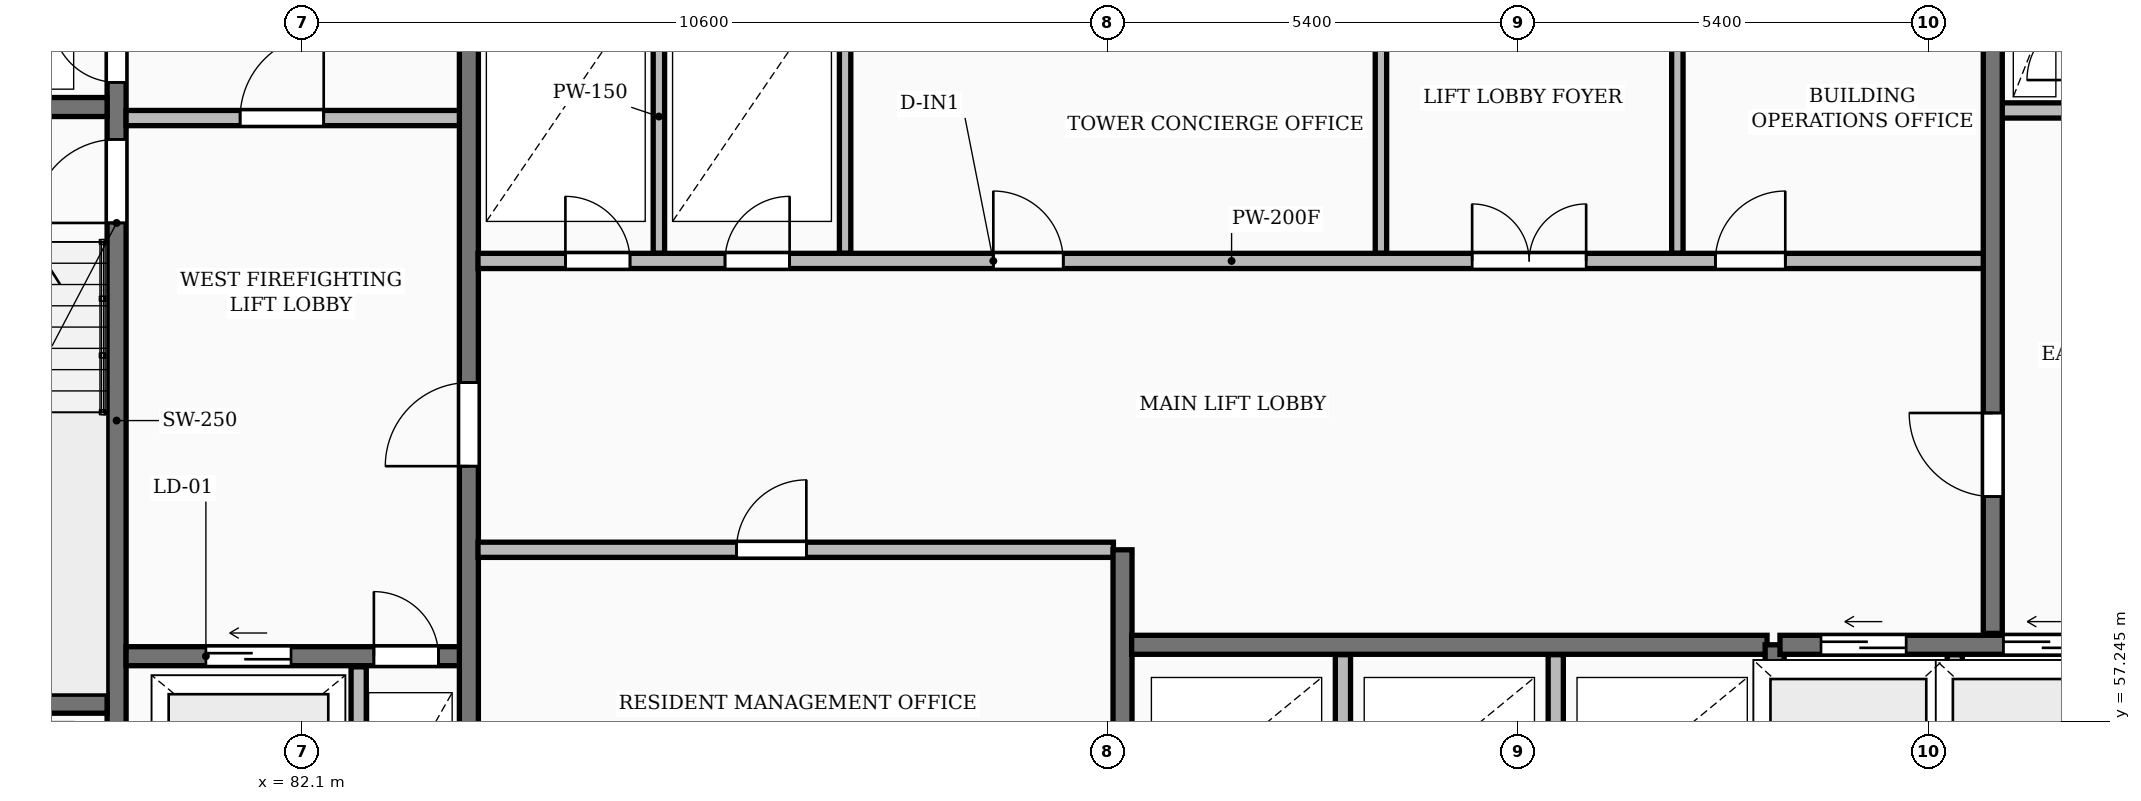
"""IFC4 building model, lengths in metres.
Left out: names, types, materials, properties, quantities, classifications, styles, units other than length and angle.
Written with IfcOpenShell. Run it as: python <this file> out.ifc"""

import sys

from ifc_helpers import new_model, si_unit, direction, frame, frame_2d, origin, place, context, subcontext, project, spatial, rectangle, extrude, element, fill, save


model = new_model("IFC4")
c1 = context("Model", 3, precision=1e-05, world=origin(), true_north=direction((0.0, 1.0)))
c2 = subcontext(c1, "Body", "Model", "MODEL_VIEW")
j1 = project(units=[si_unit("LENGTHUNIT", "METRE"), si_unit("PLANEANGLEUNIT", "RADIAN")], contexts=[c1])
p1 = place(None, origin())
s1 = spatial("IfcSite", under=j1, at=p1, CompositionType="ELEMENT")
p2 = place(p1, origin())
s2 = spatial("IfcBuilding", under=s1, at=p2, CompositionType="ELEMENT")
p3 = place(p2, frame((0.0, 0.0, 178.35)))
s3 = spatial("IfcBuildingStorey", under=s2, at=p3, CompositionType="ELEMENT", Elevation=178.35)
p4 = place(p3, frame((79.665, 55.4, 0.0), z_axis=(0.0, 0.0, 1.0), x_axis=(0.0, 1.0, 0.0)))
e1 = element("IfcWall", 1, at=p4, inside=s3, PredefinedType="SHEAR", context=c2, shape_type="SweptSolid", body=[
    extrude(rectangle(XDim=11.6, YDim=0.25, at=frame_2d((5.8, 0.0))), origin(), (0.0, 0.0, 1.0), 3.25),
])
p5 = place(p4, frame((0.55, 0.0, 0.0)))
e2 = element("IfcOpeningElement", 2, at=p5, cuts=e1, PredefinedType="OPENING", context=c2, shape_type="SweptSolid", body=[
    extrude(rectangle(XDim=0.85, YDim=2.05, at=frame_2d((0.425, 1.025))), frame((0.0, 0.135, 0.0), z_axis=(0.0, -1.0, 0.0), x_axis=(1.0, 0.0, 0.0)), (0.0, 0.0, 1.0), 0.27),
])
p6 = place(p4, frame((8.4, 0.0, 0.0)))
e3 = element("IfcOpeningElement", 3, at=p6, cuts=e1, PredefinedType="OPENING", context=c2, shape_type="SweptSolid", body=[
    extrude(rectangle(XDim=1.1, YDim=2.1, at=frame_2d((0.55, 1.05))), frame((0.0, 0.135, 0.0), z_axis=(0.0, -1.0, 0.0), x_axis=(1.0, 0.0, 0.0)), (0.0, 0.0, 1.0), 0.27),
])
p7 = place(p4, frame((10.25, 0.0, 0.0)))
e4 = element("IfcOpeningElement", 4, at=p7, cuts=e1, PredefinedType="OPENING", context=c2, shape_type="SweptSolid", body=[
    extrude(rectangle(XDim=0.85, YDim=2.05, at=frame_2d((0.425, 1.025))), frame((0.0, 0.135, 0.0), z_axis=(0.0, -1.0, 0.0), x_axis=(1.0, 0.0, 0.0)), (0.0, 0.0, 1.0), 0.27),
])
for number, where, z_axis, x_axis in (
    (5, (76.3, 57.475, 0.0), (0.0, 0.0, 1.0), (1.0, 0.0, 0.0)),
    (6, (76.3, 65.325, 0.0), (0.0, 0.0, 1.0), (1.0, 0.0, 0.0)),
):
    element("IfcWall", number, at=place(p3, frame(where, z_axis=z_axis, x_axis=x_axis)), inside=s3, PredefinedType="SHEAR", context=c2, shape_type="SweptSolid", body=[
        extrude(rectangle(XDim=3.24, YDim=0.25, at=frame_2d((1.62, 0.0))), origin(), (0.0, 0.0, 1.0), 3.25),
    ])
p8 = place(p3, frame((79.79, 58.1, 0.0), z_axis=(0.0, 0.0, 1.0), x_axis=(1.0, 0.0, 0.0)))
e7 = element("IfcWall", 7, at=p8, inside=s3, PredefinedType="SHEAR", context=c2, shape_type="SweptSolid", body=[
    extrude(rectangle(XDim=4.39, YDim=0.25, at=frame_2d((2.195, 0.0))), origin(), (0.0, 0.0, 1.0), 3.25),
])
p9 = place(p8, frame((1.05, 0.0, 0.0)))
e8 = element("IfcOpeningElement", 8, at=p9, cuts=e7, PredefinedType="OPENING", context=c2, shape_type="SweptSolid", body=[
    extrude(rectangle(XDim=1.12, YDim=2.12, at=frame_2d((0.56, 1.06))), frame((0.0, 0.135, 0.0), z_axis=(0.0, -1.0, 0.0), x_axis=(1.0, 0.0, 0.0)), (0.0, 0.0, 1.0), 0.27),
])
p10 = place(p8, frame((3.26, 0.0, 0.0)))
e9 = element("IfcOpeningElement", 9, at=p10, cuts=e7, PredefinedType="OPENING", context=c2, shape_type="SweptSolid", body=[
    extrude(rectangle(XDim=0.85, YDim=2.05, at=frame_2d((0.425, 1.025))), frame((0.0, 0.135, 0.0), z_axis=(0.0, -1.0, 0.0), x_axis=(1.0, 0.0, 0.0)), (0.0, 0.0, 1.0), 0.27),
])
p11 = place(p3, frame((82.85, 55.4, 0.0), z_axis=(0.0, 0.0, 1.0), x_axis=(0.0, 1.0, 0.0)))
e10 = element("IfcWall", 10, at=p11, inside=s3, PredefinedType="PARTITIONING", context=c2, shape_type="SweptSolid", body=[
    extrude(rectangle(XDim=2.56, YDim=0.2, at=frame_2d((1.28, 0.0))), origin(), (0.0, 0.0, 1.0), 2.97),
])
p12 = place(p3, frame((79.79, 65.18, 0.0), z_axis=(0.0, 0.0, 1.0), x_axis=(1.0, 0.0, 0.0)))
e11 = element("IfcWall", 11, at=p12, inside=s3, PredefinedType="PARTITIONING", context=c2, shape_type="SweptSolid", body=[
    extrude(rectangle(XDim=4.39, YDim=0.2, at=frame_2d((2.195, 0.0))), origin(), (0.0, 0.0, 1.0), 2.97),
])
p13 = place(p12, frame((1.5, 0.0, 0.0)))
e12 = element("IfcOpeningElement", 12, at=p13, cuts=e11, PredefinedType="OPENING", context=c2, shape_type="SweptSolid", body=[
    extrude(rectangle(XDim=1.1, YDim=2.1, at=frame_2d((0.55, 1.05))), frame((0.0, 0.11, 0.0), z_axis=(0.0, -1.0, 0.0), x_axis=(1.0, 0.0, 0.0)), (0.0, 0.0, 1.0), 0.22),
])
p14 = place(p3, frame((84.3, 55.4, 0.0), z_axis=(0.0, 0.0, 1.0), x_axis=(0.0, 1.0, 0.0)))
e13 = element("IfcWall", 13, at=p14, inside=s3, PredefinedType="SHEAR", context=c2, shape_type="SweptSolid", body=[
    extrude(rectangle(XDim=11.6, YDim=0.25, at=frame_2d((5.8, 0.0))), origin(), (0.0, 0.0, 1.0), 3.25),
])
p15 = place(p14, frame((5.2, 0.0, 0.0)))
e14 = element("IfcOpeningElement", 14, at=p15, cuts=e13, PredefinedType="OPENING", context=c2, shape_type="SweptSolid", body=[
    extrude(rectangle(XDim=1.1, YDim=2.1, at=frame_2d((0.55, 1.05))), frame((0.0, 0.135, 0.0), z_axis=(0.0, -1.0, 0.0), x_axis=(1.0, 0.0, 0.0)), (0.0, 0.0, 1.0), 0.27),
])
p16 = place(p3, frame((84.42, 59.5, 0.0), z_axis=(0.0, 0.0, 1.0), x_axis=(1.0, 0.0, 0.0)))
e15 = element("IfcWall", 15, at=p16, inside=s3, PredefinedType="PARTITIONING", context=c2, shape_type="SweptSolid", body=[
    extrude(rectangle(XDim=8.36, YDim=0.2, at=frame_2d((4.18, 0.0))), origin(), (0.0, 0.0, 1.0), 2.97),
])
p17 = place(p16, frame((3.4, 0.0, 0.0)))
e16 = element("IfcOpeningElement", 16, at=p17, cuts=e15, PredefinedType="OPENING", context=c2, shape_type="SweptSolid", body=[
    extrude(rectangle(XDim=0.92, YDim=2.08, at=frame_2d((0.46, 1.04))), frame((0.0, 0.11, 0.0), z_axis=(0.0, -1.0, 0.0), x_axis=(1.0, 0.0, 0.0)), (0.0, 0.0, 1.0), 0.22),
])
p18 = place(p3, frame((92.9, 55.4, 0.0), z_axis=(0.0, 0.0, 1.0), x_axis=(0.0, 1.0, 0.0)))
e17 = element("IfcWall", 17, at=p18, inside=s3, PredefinedType="SHEAR", context=c2, shape_type="SweptSolid", body=[
    extrude(rectangle(XDim=4.1, YDim=0.25, at=frame_2d((2.05, 0.0))), origin(), (0.0, 0.0, 1.0), 3.25),
])
for number, where, z_axis, x_axis in (
    (18, (95.8, 55.4, 0.0), (0.0, 0.0, 1.0), (0.0, 1.0, 0.0)),
    (19, (98.6, 55.4, 0.0), (0.0, 0.0, 1.0), (0.0, 1.0, 0.0)),
):
    element("IfcWall", number, at=place(p3, frame(where, z_axis=z_axis, x_axis=x_axis)), inside=s3, PredefinedType="PARTITIONING", context=c2, shape_type="SweptSolid", body=[
        extrude(rectangle(XDim=2.72, YDim=0.2, at=frame_2d((1.36, 0.0))), origin(), (0.0, 0.0, 1.0), 2.97),
    ])
p19 = place(p3, frame((93.02, 58.25, 0.0), z_axis=(0.0, 0.0, 1.0), x_axis=(1.0, 0.0, 0.0)))
e20 = element("IfcWall", 20, at=p19, inside=s3, PredefinedType="SHEAR", context=c2, shape_type="SweptSolid", body=[
    extrude(rectangle(XDim=8.36, YDim=0.25, at=frame_2d((4.18, 0.0))), origin(), (0.0, 0.0, 1.0), 3.25),
])
p20 = place(p3, frame((101.48, 55.4, 0.0), z_axis=(0.0, 0.0, 1.0), x_axis=(0.0, 1.0, 0.0)))
e21 = element("IfcWall", 21, at=p20, inside=s3, PredefinedType="SHEAR", context=c2, shape_type="SweptSolid", body=[
    extrude(rectangle(XDim=2.85, YDim=0.25, at=frame_2d((1.425, 0.0))), origin(), (0.0, 0.0, 1.0), 3.25),
])
p21 = place(p3, frame((103.85, 55.4, 0.0), z_axis=(0.0, 0.0, 1.0), x_axis=(0.0, 1.0, 0.0)))
e22 = element("IfcWall", 22, at=p21, inside=s3, PredefinedType="PARTITIONING", context=c2, shape_type="SweptSolid", body=[
    extrude(rectangle(XDim=2.72, YDim=0.2, at=frame_2d((1.36, 0.0))), origin(), (0.0, 0.0, 1.0), 2.97),
])
p22 = place(p3, frame((101.55, 58.25, 0.0), z_axis=(0.0, 0.0, 1.0), x_axis=(1.0, 0.0, 0.0)))
e23 = element("IfcWall", 23, at=p22, inside=s3, PredefinedType="SHEAR", context=c2, shape_type="SweptSolid", body=[
    extrude(rectangle(XDim=4.6, YDim=0.25, at=frame_2d((2.3, 0.0))), origin(), (0.0, 0.0, 1.0), 3.25),
])
p23 = place(p22, frame((0.54, 0.0, 0.0)))
e24 = element("IfcOpeningElement", 24, at=p23, cuts=e23, PredefinedType="OPENING", context=c2, shape_type="SweptSolid", body=[
    extrude(rectangle(XDim=1.12, YDim=2.12, at=frame_2d((0.56, 1.06))), frame((0.0, 0.135, 0.0), z_axis=(0.0, -1.0, 0.0), x_axis=(1.0, 0.0, 0.0)), (0.0, 0.0, 1.0), 0.27),
])
p24 = place(p22, frame((2.94, 0.0, 0.0)))
e25 = element("IfcOpeningElement", 25, at=p24, cuts=e23, PredefinedType="OPENING", context=c2, shape_type="SweptSolid", body=[
    extrude(rectangle(XDim=1.12, YDim=2.12, at=frame_2d((0.56, 1.06))), frame((0.0, 0.135, 0.0), z_axis=(0.0, -1.0, 0.0), x_axis=(1.0, 0.0, 0.0)), (0.0, 0.0, 1.0), 0.27),
])
for number, where, z_axis, x_axis in (
    (26, (86.8, 63.4, 0.0), (0.0, 0.0, 1.0), (0.0, 1.0, 0.0)),
    (27, (89.25, 63.4, 0.0), (0.0, 0.0, 1.0), (0.0, 1.0, 0.0)),
    (28, (96.3, 63.4, 0.0), (0.0, 0.0, 1.0), (0.0, 1.0, 0.0)),
    (29, (100.2, 63.4, 0.0), (0.0, 0.0, 1.0), (0.0, 1.0, 0.0)),
):
    element("IfcWall", number, at=place(p3, frame(where, z_axis=z_axis, x_axis=x_axis)), inside=s3, PredefinedType="PARTITIONING", context=c2, shape_type="SweptSolid", body=[
        extrude(rectangle(XDim=3.6, YDim=0.15, at=frame_2d((1.8, 0.0))), origin(), (0.0, 0.0, 1.0), 2.97),
    ])
p25 = place(p3, frame((84.42, 63.3, 0.0), z_axis=(0.0, 0.0, 1.0), x_axis=(1.0, 0.0, 0.0)))
e30 = element("IfcWall", 30, at=p25, inside=s3, PredefinedType="PARTITIONING", context=c2, shape_type="SweptSolid", body=[
    extrude(rectangle(XDim=19.83, YDim=0.2, at=frame_2d((9.915, 0.0))), origin(), (0.0, 0.0, 1.0), 2.97),
])
p26 = place(p25, frame((1.15, 0.0, 0.0)))
e31 = element("IfcOpeningElement", 31, at=p26, cuts=e30, PredefinedType="OPENING", context=c2, shape_type="SweptSolid", body=[
    extrude(rectangle(XDim=0.85, YDim=2.05, at=frame_2d((0.425, 1.025))), frame((0.0, 0.11, 0.0), z_axis=(0.0, -1.0, 0.0), x_axis=(1.0, 0.0, 0.0)), (0.0, 0.0, 1.0), 0.22),
])
p27 = place(p25, frame((3.25, 0.0, 0.0)))
e32 = element("IfcOpeningElement", 32, at=p27, cuts=e30, PredefinedType="OPENING", context=c2, shape_type="SweptSolid", body=[
    extrude(rectangle(XDim=0.85, YDim=2.05, at=frame_2d((0.425, 1.025))), frame((0.0, 0.11, 0.0), z_axis=(0.0, -1.0, 0.0), x_axis=(1.0, 0.0, 0.0)), (0.0, 0.0, 1.0), 0.22),
])
p28 = place(p25, frame((13.08, 0.0, 0.0)))
e33 = element("IfcOpeningElement", 33, at=p28, cuts=e30, PredefinedType="OPENING", context=c2, shape_type="SweptSolid", body=[
    extrude(rectangle(XDim=1.5, YDim=2.2, at=frame_2d((0.75, 1.1))), frame((0.0, 0.11, 0.0), z_axis=(0.0, -1.0, 0.0), x_axis=(1.0, 0.0, 0.0)), (0.0, 0.0, 1.0), 0.22),
])
p29 = place(p25, frame((6.78, 0.0, 0.0)))
e34 = element("IfcOpeningElement", 34, at=p29, cuts=e30, PredefinedType="OPENING", context=c2, shape_type="SweptSolid", body=[
    extrude(rectangle(XDim=0.92, YDim=2.08, at=frame_2d((0.46, 1.04))), frame((0.0, 0.11, 0.0), z_axis=(0.0, -1.0, 0.0), x_axis=(1.0, 0.0, 0.0)), (0.0, 0.0, 1.0), 0.22),
])
p30 = place(p25, frame((16.28, 0.0, 0.0)))
e35 = element("IfcOpeningElement", 35, at=p30, cuts=e30, PredefinedType="OPENING", context=c2, shape_type="SweptSolid", body=[
    extrude(rectangle(XDim=0.92, YDim=2.08, at=frame_2d((0.46, 1.04))), frame((0.0, 0.11, 0.0), z_axis=(0.0, -1.0, 0.0), x_axis=(1.0, 0.0, 0.0)), (0.0, 0.0, 1.0), 0.22),
])
p31 = place(p3, frame((104.45, 65.28, 0.0), z_axis=(0.0, 0.0, 1.0), x_axis=(1.0, 0.0, 0.0)))
e36 = element("IfcWall", 36, at=p31, inside=s3, PredefinedType="PARTITIONING", context=c2, shape_type="SweptSolid", body=[
    extrude(rectangle(XDim=1.2, YDim=0.2, at=frame_2d((0.6, 0.0))), origin(), (0.0, 0.0, 1.0), 2.97),
])
p32 = place(p3, frame((104.35, 58.4, 0.0), z_axis=(0.0, 0.0, 1.0), x_axis=(0.0, 1.0, 0.0)))
e37 = element("IfcWall", 37, at=p32, inside=s3, PredefinedType="SHEAR", context=c2, shape_type="SweptSolid", body=[
    extrude(rectangle(XDim=8.6, YDim=0.25, at=frame_2d((4.3, 0.0))), origin(), (0.0, 0.0, 1.0), 3.25),
])
p33 = place(p32, frame((1.8, 0.0, 0.0)))
e38 = element("IfcOpeningElement", 38, at=p33, cuts=e37, PredefinedType="OPENING", context=c2, shape_type="SweptSolid", body=[
    extrude(rectangle(XDim=1.1, YDim=2.1, at=frame_2d((0.55, 1.05))), frame((0.0, 0.135, 0.0), z_axis=(0.0, -1.0, 0.0), x_axis=(1.0, 0.0, 0.0)), (0.0, 0.0, 1.0), 0.27),
])
p34 = place(p6, origin())
e39 = element("IfcDoor", 39, at=p34, inside=s3, OperationType="SINGLE_SWING_LEFT", PredefinedType="DOOR", context=c2, shape_type="SweptSolid", body=[
    extrude(rectangle(XDim=1.1, YDim=2.1, at=frame_2d((0.55, 1.05))), frame((0.0, 0.025, 0.0), z_axis=(0.0, -1.0, 0.0), x_axis=(1.0, 0.0, 0.0)), (0.0, 0.0, 1.0), 0.05),
])
fill(e3, e39)
p35 = place(p7, origin())
e40 = element("IfcDoor", 40, at=p35, inside=s3, OperationType="SINGLE_SWING_RIGHT", PredefinedType="DOOR", context=c2, shape_type="SweptSolid", body=[
    extrude(rectangle(XDim=0.85, YDim=2.05, at=frame_2d((0.425, 1.025))), frame((0.0, 0.025, 0.0), z_axis=(0.0, -1.0, 0.0), x_axis=(1.0, 0.0, 0.0)), (0.0, 0.0, 1.0), 0.05),
])
fill(e4, e40)
p36 = place(p9, origin())
e41 = element("IfcDoor", 41, at=p36, inside=s3, OperationType="SLIDING_TO_LEFT", PredefinedType="DOOR", context=c2, shape_type="SweptSolid", body=[
    extrude(rectangle(XDim=1.12, YDim=2.12, at=frame_2d((0.56, 1.06))), frame((0.0, 0.025, 0.0), z_axis=(0.0, -1.0, 0.0), x_axis=(1.0, 0.0, 0.0)), (0.0, 0.0, 1.0), 0.05),
])
fill(e8, e41)
p37 = place(p10, origin())
e42 = element("IfcDoor", 42, at=p37, inside=s3, OperationType="SINGLE_SWING_LEFT", PredefinedType="DOOR", context=c2, shape_type="SweptSolid", body=[
    extrude(rectangle(XDim=0.85, YDim=2.05, at=frame_2d((0.425, 1.025))), frame((0.0, 0.025, 0.0), z_axis=(0.0, -1.0, 0.0), x_axis=(1.0, 0.0, 0.0)), (0.0, 0.0, 1.0), 0.05),
])
fill(e9, e42)
p38 = place(p13, origin())
e43 = element("IfcDoor", 43, at=p38, inside=s3, OperationType="SINGLE_SWING_RIGHT", PredefinedType="DOOR", context=c2, shape_type="SweptSolid", body=[
    extrude(rectangle(XDim=1.1, YDim=2.1, at=frame_2d((0.55, 1.05))), frame((0.0, 0.025, 0.0), z_axis=(0.0, -1.0, 0.0), x_axis=(1.0, 0.0, 0.0)), (0.0, 0.0, 1.0), 0.05),
])
fill(e12, e43)
p39 = place(p15, origin())
e44 = element("IfcDoor", 44, at=p39, inside=s3, OperationType="SINGLE_SWING_LEFT", PredefinedType="DOOR", context=c2, shape_type="SweptSolid", body=[
    extrude(rectangle(XDim=1.1, YDim=2.1, at=frame_2d((0.55, 1.05))), frame((0.0, 0.025, 0.0), z_axis=(0.0, -1.0, 0.0), x_axis=(1.0, 0.0, 0.0)), (0.0, 0.0, 1.0), 0.05),
])
fill(e14, e44)
p40 = place(p17, origin())
e45 = element("IfcDoor", 45, at=p40, inside=s3, OperationType="SINGLE_SWING_RIGHT", PredefinedType="DOOR", context=c2, shape_type="SweptSolid", body=[
    extrude(rectangle(XDim=0.92, YDim=2.08, at=frame_2d((0.46, 1.04))), frame((0.0, 0.025, 0.0), z_axis=(0.0, -1.0, 0.0), x_axis=(1.0, 0.0, 0.0)), (0.0, 0.0, 1.0), 0.05),
])
fill(e16, e45)
p41 = place(p23, origin())
e46 = element("IfcDoor", 46, at=p41, inside=s3, OperationType="SLIDING_TO_LEFT", PredefinedType="DOOR", context=c2, shape_type="SweptSolid", body=[
    extrude(rectangle(XDim=1.12, YDim=2.12, at=frame_2d((0.56, 1.06))), frame((0.0, 0.025, 0.0), z_axis=(0.0, -1.0, 0.0), x_axis=(1.0, 0.0, 0.0)), (0.0, 0.0, 1.0), 0.05),
])
fill(e24, e46)
p42 = place(p24, origin())
e47 = element("IfcDoor", 47, at=p42, inside=s3, OperationType="SLIDING_TO_LEFT", PredefinedType="DOOR", context=c2, shape_type="SweptSolid", body=[
    extrude(rectangle(XDim=1.12, YDim=2.12, at=frame_2d((0.56, 1.06))), frame((0.0, 0.025, 0.0), z_axis=(0.0, -1.0, 0.0), x_axis=(1.0, 0.0, 0.0)), (0.0, 0.0, 1.0), 0.05),
])
fill(e25, e47)
p43 = place(p26, origin())
e48 = element("IfcDoor", 48, at=p43, inside=s3, OperationType="SINGLE_SWING_LEFT", PredefinedType="DOOR", context=c2, shape_type="SweptSolid", body=[
    extrude(rectangle(XDim=0.85, YDim=2.05, at=frame_2d((0.425, 1.025))), frame((0.0, 0.025, 0.0), z_axis=(0.0, -1.0, 0.0), x_axis=(1.0, 0.0, 0.0)), (0.0, 0.0, 1.0), 0.05),
])
fill(e31, e48)
p44 = place(p27, origin())
e49 = element("IfcDoor", 49, at=p44, inside=s3, OperationType="SINGLE_SWING_RIGHT", PredefinedType="DOOR", context=c2, shape_type="SweptSolid", body=[
    extrude(rectangle(XDim=0.85, YDim=2.05, at=frame_2d((0.425, 1.025))), frame((0.0, 0.025, 0.0), z_axis=(0.0, -1.0, 0.0), x_axis=(1.0, 0.0, 0.0)), (0.0, 0.0, 1.0), 0.05),
])
fill(e32, e49)
p45 = place(p28, origin())
e50 = element("IfcDoor", 50, at=p45, inside=s3, OperationType="DOUBLE_DOOR_SINGLE_SWING", PredefinedType="DOOR", context=c2, shape_type="SweptSolid", body=[
    extrude(rectangle(XDim=1.5, YDim=2.2, at=frame_2d((0.75, 1.1))), frame((0.0, 0.025, 0.0), z_axis=(0.0, -1.0, 0.0), x_axis=(1.0, 0.0, 0.0)), (0.0, 0.0, 1.0), 0.05),
])
fill(e33, e50)
p46 = place(p29, origin())
e51 = element("IfcDoor", 51, at=p46, inside=s3, OperationType="SINGLE_SWING_LEFT", PredefinedType="DOOR", context=c2, shape_type="SweptSolid", body=[
    extrude(rectangle(XDim=0.92, YDim=2.08, at=frame_2d((0.46, 1.04))), frame((0.0, 0.025, 0.0), z_axis=(0.0, -1.0, 0.0), x_axis=(1.0, 0.0, 0.0)), (0.0, 0.0, 1.0), 0.05),
])
fill(e34, e51)
p47 = place(p30, origin())
e52 = element("IfcDoor", 52, at=p47, inside=s3, OperationType="SINGLE_SWING_RIGHT", PredefinedType="DOOR", context=c2, shape_type="SweptSolid", body=[
    extrude(rectangle(XDim=0.92, YDim=2.08, at=frame_2d((0.46, 1.04))), frame((0.0, 0.025, 0.0), z_axis=(0.0, -1.0, 0.0), x_axis=(1.0, 0.0, 0.0)), (0.0, 0.0, 1.0), 0.05),
])
fill(e35, e52)
p48 = place(p33, origin())
e53 = element("IfcDoor", 53, at=p48, inside=s3, OperationType="SINGLE_SWING_RIGHT", PredefinedType="DOOR", context=c2, shape_type="SweptSolid", body=[
    extrude(rectangle(XDim=1.1, YDim=2.1, at=frame_2d((0.55, 1.05))), frame((0.0, 0.025, 0.0), z_axis=(0.0, -1.0, 0.0), x_axis=(1.0, 0.0, 0.0)), (0.0, 0.0, 1.0), 0.05),
])
fill(e38, e53)
save(model, sys.argv[1])
